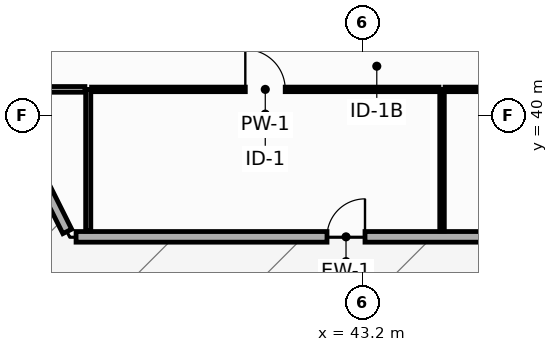
"""IFC4 building model, lengths in metres.
Left out: names, types, materials, properties, quantities, classifications, styles, units other than length and angle.
Written with IfcOpenShell. Run it as: python <this file> out.ifc"""

import sys

from ifc_helpers import new_model, si_unit, direction, frame, frame_2d, origin, place, context, subcontext, project, spatial, rectangle, extrude, element, fill, save


model = new_model("IFC4")
c1 = context("Model", 3, precision=1e-05, world=origin(), true_north=direction((0.0, 1.0)))
c2 = subcontext(c1, "Body", "Model", "MODEL_VIEW")
j1 = project(units=[si_unit("LENGTHUNIT", "METRE"), si_unit("PLANEANGLEUNIT", "RADIAN")], contexts=[c1])
p1 = place(None, origin())
s1 = spatial("IfcSite", under=j1, at=p1, CompositionType="ELEMENT")
p2 = place(p1, origin())
s2 = spatial("IfcBuilding", under=s1, at=p2, CompositionType="ELEMENT")
p3 = place(p2, frame((0.0, 0.0, 310.4)))
s3 = spatial("IfcBuildingStorey", under=s2, at=p3, CompositionType="ELEMENT", Elevation=310.4)
p4 = place(p3, frame((34.372, 39.057, 0.0), z_axis=(0.0, 0.0, 1.0), x_axis=(0.4472135955, -0.894427191, 0.0)))
e1 = element("IfcWall", 1, at=p4, inside=s3, PredefinedType="STANDARD", context=c2, shape_type="SweptSolid", body=[
    extrude(rectangle(XDim=2.363, YDim=0.26, at=frame_2d((1.182, 0.0))), origin(), (0.0, 0.0, 1.0), 3.55),
])
p5 = place(p3, frame((35.66, 36.8, 0.0), z_axis=(0.0, 0.0, 1.0), x_axis=(1.0, 0.0, 0.0)))
e2 = element("IfcWall", 2, at=p5, inside=s3, PredefinedType="STANDARD", context=c2, shape_type="SweptSolid", body=[
    extrude(rectangle(XDim=14.207, YDim=0.28, at=frame_2d((7.104, 0.0))), origin(), (0.0, 0.0, 1.0), 3.55),
])
p6 = place(p5, frame((6.603, 0.0, 0.0)))
e3 = element("IfcOpeningElement", 3, at=p6, cuts=e2, PredefinedType="OPENING", context=c2, shape_type="SweptSolid", body=[
    extrude(rectangle(XDim=1.0, YDim=2.2, at=frame_2d((0.5, 1.1))), frame((0.0, 0.15, 0.0), z_axis=(0.0, -1.0, 0.0), x_axis=(1.0, 0.0, 0.0)), (0.0, 0.0, 1.0), 0.3),
])
p7 = place(p3, frame((35.98, 36.96, 0.0), z_axis=(0.0, 0.0, 1.0), x_axis=(0.0, 1.0, 0.0)))
e4 = element("IfcWall", 4, at=p7, inside=s3, PredefinedType="PARTITIONING", context=c2, shape_type="SweptSolid", body=[
    extrude(rectangle(XDim=3.72, YDim=0.135, at=frame_2d((1.86, 0.0))), origin(), (0.0, 0.0, 1.0), 3.55),
])
p8 = place(p3, frame((45.29, 36.96, 0.0), z_axis=(0.0, 0.0, 1.0), x_axis=(0.0, 1.0, 0.0)))
e5 = element("IfcWall", 5, at=p8, inside=s3, PredefinedType="PARTITIONING", context=c2, shape_type="SweptSolid", body=[
    extrude(rectangle(XDim=3.72, YDim=0.12, at=frame_2d((1.86, 0.0))), origin(), (0.0, 0.0, 1.0), 3.55),
])
p9 = place(p3, frame((28.19, 40.68, 0.0), z_axis=(0.0, 0.0, 1.0), x_axis=(1.0, 0.0, 0.0)))
e6 = element("IfcWall", 6, at=p9, inside=s3, PredefinedType="PARTITIONING", context=c2, shape_type="SweptSolid", body=[
    extrude(rectangle(XDim=7.703, YDim=0.15, at=frame_2d((3.851, 0.0))), origin(), (0.0, 0.0, 1.0), 3.55),
])
p10 = place(p9, frame((3.326, 0.0, 0.0)))
e7 = element("IfcOpeningElement", 7, at=p10, cuts=e6, PredefinedType="OPENING", context=c2, shape_type="SweptSolid", body=[
    extrude(rectangle(XDim=1.05, YDim=2.15, at=frame_2d((0.525, 1.075))), frame((0.0, 0.085, 0.0), z_axis=(0.0, -1.0, 0.0), x_axis=(1.0, 0.0, 0.0)), (0.0, 0.0, 1.0), 0.17),
])
p11 = place(p3, frame((36.067, 40.68, 0.0), z_axis=(0.0, 0.0, 1.0), x_axis=(1.0, 0.0, 0.0)))
e8 = element("IfcWall", 8, at=p11, inside=s3, PredefinedType="PARTITIONING", context=c2, shape_type="SweptSolid", body=[
    extrude(rectangle(XDim=9.143, YDim=0.12, at=frame_2d((4.571, 0.0))), origin(), (0.0, 0.0, 1.0), 3.55),
])
p12 = place(p11, frame((4.046, 0.0, 0.0)))
e9 = element("IfcOpeningElement", 9, at=p12, cuts=e8, PredefinedType="OPENING", context=c2, shape_type="SweptSolid", body=[
    extrude(rectangle(XDim=1.05, YDim=2.15, at=frame_2d((0.525, 1.075))), frame((0.0, 0.07, 0.0), z_axis=(0.0, -1.0, 0.0), x_axis=(1.0, 0.0, 0.0)), (0.0, 0.0, 1.0), 0.14),
])
p13 = place(p3, frame((45.37, 40.68, 0.0), z_axis=(0.0, 0.0, 1.0), x_axis=(1.0, 0.0, 0.0)))
e10 = element("IfcWall", 10, at=p13, inside=s3, PredefinedType="PARTITIONING", context=c2, shape_type="SweptSolid", body=[
    extrude(rectangle(XDim=7.999, YDim=0.12, at=frame_2d((4.0, 0.0))), origin(), (0.0, 0.0, 1.0), 3.085),
])
p14 = place(p13, frame((3.499, 0.0, 0.0)))
e11 = element("IfcOpeningElement", 11, at=p14, cuts=e10, PredefinedType="OPENING", context=c2, shape_type="SweptSolid", body=[
    extrude(rectangle(XDim=1.0, YDim=2.15, at=frame_2d((0.5, 1.075))), frame((0.0, 0.07, 0.0), z_axis=(0.0, -1.0, 0.0), x_axis=(1.0, 0.0, 0.0)), (0.0, 0.0, 1.0), 0.14),
])
p15 = place(p6, origin())
e12 = element("IfcDoor", 12, at=p15, inside=s3, OperationType="SINGLE_SWING_RIGHT", PredefinedType="DOOR", context=c2, shape_type="SweptSolid", body=[
    extrude(rectangle(XDim=1.0, YDim=2.2, at=frame_2d((0.5, 1.1))), frame((0.0, 0.025, 0.0), z_axis=(0.0, -1.0, 0.0), x_axis=(1.0, 0.0, 0.0)), (0.0, 0.0, 1.0), 0.05),
])
fill(e3, e12)
p16 = place(p12, origin())
e13 = element("IfcDoor", 13, at=p16, inside=s3, OperationType="SINGLE_SWING_LEFT", PredefinedType="DOOR", context=c2, shape_type="SweptSolid", body=[
    extrude(rectangle(XDim=1.05, YDim=2.15, at=frame_2d((0.525, 1.075))), frame((0.0, 0.025, 0.0), z_axis=(0.0, -1.0, 0.0), x_axis=(1.0, 0.0, 0.0)), (0.0, 0.0, 1.0), 0.05),
])
fill(e9, e13)
save(model, sys.argv[1])
